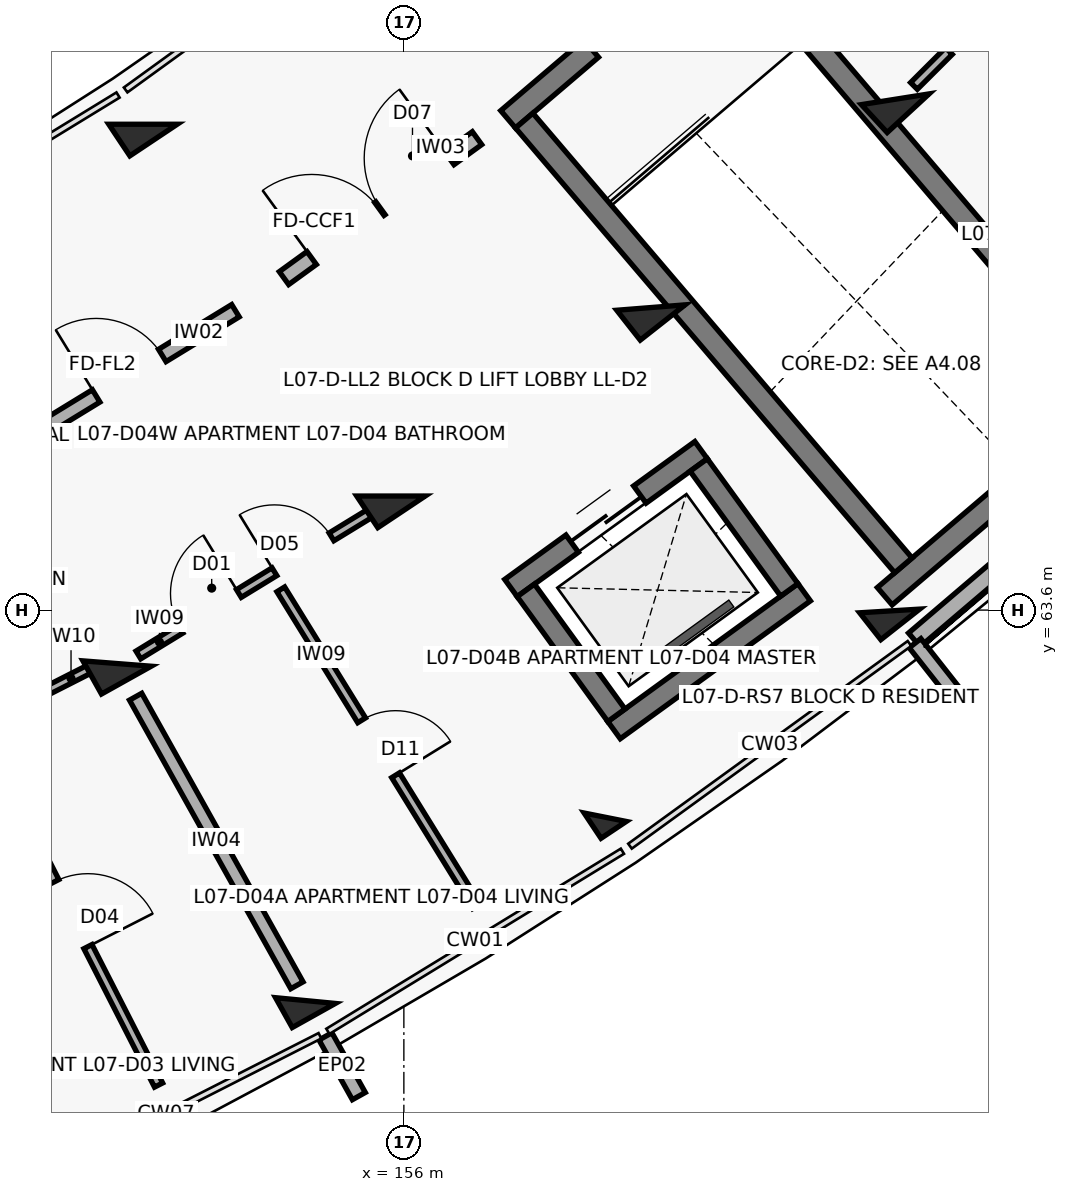
"""IFC4 building model, lengths in metres.
Left out: names, types, materials, properties, quantities, classifications, styles, units other than length and angle.
Written with IfcOpenShell. Run it as: python <this file> out.ifc"""

import sys

from ifc_helpers import new_model, si_unit, direction, frame, frame_2d, origin, origin_2d, place, context, subcontext, project, spatial, rectangle, extrude, element, fill, save


model = new_model("IFC4")
c1 = context("Model", 3, precision=1e-05, world=origin(), true_north=direction((0.0, 1.0)))
c2 = subcontext(c1, "Body", "Model", "MODEL_VIEW")
j1 = project(units=[si_unit("LENGTHUNIT", "METRE"), si_unit("PLANEANGLEUNIT", "RADIAN")], contexts=[c1])
p1 = place(None, origin())
s1 = spatial("IfcSite", under=j1, at=p1, CompositionType="ELEMENT")
p2 = place(p1, origin())
s2 = spatial("IfcBuilding", under=s1, at=p2, CompositionType="ELEMENT")
p3 = place(p2, frame((0.0, 0.0, 23.6)))
s3 = spatial("IfcBuildingStorey", under=s2, at=p3, CompositionType="ELEMENT", Elevation=23.6)
p4 = place(p3, frame((152.227, 62.897, 0.0), z_axis=(0.0, 0.0, 1.0), x_axis=(0.487859659139, -0.87292207727, 0.0)))
e1 = element("IfcColumn", 1, at=p4, inside=s3, PredefinedType="COLUMN", context=c2, shape_type="SweptSolid", body=[
    extrude(rectangle(XDim=0.5, YDim=0.75, at=origin_2d()), origin(), (0.0, 0.0, 1.0), 3.1),
])
p5 = place(p3, frame((154.705, 58.462, 0.0), z_axis=(0.0, 0.0, 1.0), x_axis=(0.487859659139, -0.87292207727, 0.0)))
e2 = element("IfcColumn", 2, at=p5, inside=s3, PredefinedType="COLUMN", context=c2, shape_type="SweptSolid", body=[
    extrude(rectangle(XDim=0.45, YDim=0.65, at=origin_2d()), origin(), (0.0, 0.0, 1.0), 3.1),
])
for number, where, z_axis, x_axis in (
    (3, (152.568, 69.993, 0.0), (0.0, 0.0, 1.0), (0.555, -0.832, 0.0)),
    (4, (155.831, 65.101, 0.0), (0.0, 0.0, 1.0), (0.555, -0.832, 0.0)),
):
    element("IfcColumn", number, at=place(p3, frame(where, z_axis=z_axis, x_axis=x_axis)), inside=s3, PredefinedType="COLUMN", context=c2, shape_type="SweptSolid", body=[
        extrude(rectangle(XDim=0.5, YDim=0.75, at=origin_2d()), origin(), (0.0, 0.0, 1.0), 3.1),
    ])
p6 = place(p3, frame((158.649, 60.875, 0.0), z_axis=(0.0, 0.0, 1.0), x_axis=(0.554844427448, -0.83195412213, 0.0)))
e5 = element("IfcColumn", 5, at=p6, inside=s3, PredefinedType="COLUMN", context=c2, shape_type="SweptSolid", body=[
    extrude(rectangle(XDim=0.4, YDim=0.4, at=origin_2d()), origin(), (0.0, 0.0, 1.0), 3.1),
])
p7 = place(p3, frame((159.25, 67.581, 0.0), z_axis=(0.0, 0.0, 1.0), x_axis=(0.618408395358, -0.785856893175, 0.0)))
e6 = element("IfcColumn", 6, at=p7, inside=s3, PredefinedType="COLUMN", context=c2, shape_type="SweptSolid", body=[
    extrude(rectangle(XDim=0.5, YDim=0.75, at=origin_2d()), origin(), (0.0, 0.0, 1.0), 3.1),
])
p8 = place(p3, frame((162.392, 63.589, 0.0), z_axis=(0.0, 0.0, 1.0), x_axis=(0.618408395358, -0.785856893175, 0.0)))
e7 = element("IfcColumn", 7, at=p8, inside=s3, PredefinedType="COLUMN", context=c2, shape_type="SweptSolid", body=[
    extrude(rectangle(XDim=0.45, YDim=0.65, at=origin_2d()), origin(), (0.0, 0.0, 1.0), 3.1),
])
p9 = place(p3, frame((162.465, 70.322, 0.0), z_axis=(0.0, 0.0, 1.0), x_axis=(0.678159669868, -0.73491459515, 0.0)))
e8 = element("IfcColumn", 8, at=p9, inside=s3, PredefinedType="COLUMN", context=c2, shape_type="SweptSolid", body=[
    extrude(rectangle(XDim=0.5, YDim=0.75, at=origin_2d()), origin(), (0.0, 0.0, 1.0), 3.1),
])
p10 = place(p3, frame((154.969, 57.991, 0.0), z_axis=(0.0, 0.0, 1.0), x_axis=(0.487967253808, -0.872861935939, 0.0)))
e9 = element("IfcWall", 9, at=p10, inside=s3, PredefinedType="PARAPET", context=c2, shape_type="SweptSolid", body=[
    extrude(rectangle(XDim=0.9, YDim=0.195, at=frame_2d((0.45, 0.0))), origin(), (0.0, 0.0, 1.0), 2.25),
])
p11 = place(p3, frame((162.716, 63.209, 0.0), z_axis=(0.0, 0.0, 1.0), x_axis=(0.760968923704, 0.64878833001, 0.0)))
e10 = element("IfcWall", 10, at=p11, inside=s3, PredefinedType="SOLIDWALL", context=c2, shape_type="SweptSolid", body=[
    extrude(rectangle(XDim=4.623, YDim=0.235, at=frame_2d((2.311, 0.0))), origin(), (0.0, 0.0, 1.0), 2.25),
])
p12 = place(p3, frame((162.726, 63.164, 0.0), z_axis=(0.0, 0.0, 1.0), x_axis=(0.618456270212, -0.785819217019, 0.0)))
e11 = element("IfcWall", 11, at=p12, inside=s3, PredefinedType="PARAPET", context=c2, shape_type="SweptSolid", body=[
    extrude(rectangle(XDim=0.9, YDim=0.195, at=frame_2d((0.45, 0.0))), origin(), (0.0, 0.0, 1.0), 2.25),
])
p13 = place(p3, frame((157.372, 70.058, 0.0), z_axis=(0.0, 0.0, 1.0), x_axis=(0.760990583254, 0.648762924495, 0.0)))
e12 = element("IfcWall", 12, at=p13, inside=s3, PredefinedType="SHEAR", context=c2, shape_type="SweptSolid", body=[
    extrude(rectangle(XDim=3.87, YDim=0.3, at=frame_2d((1.935, 0.0))), origin(), (0.0, 0.0, 1.0), 3.1),
])
p14 = place(p13, frame((1.435, 0.0, 0.0)))
e13 = element("IfcOpeningElement", 13, at=p14, cuts=e12, PredefinedType="OPENING", context=c2, shape_type="SweptSolid", body=[
    extrude(rectangle(XDim=1.0, YDim=2.15, at=frame_2d((0.5, 1.075))), frame((0.0, 0.16, 0.0), z_axis=(0.0, -1.0, 0.0), x_axis=(1.0, 0.0, 0.0)), (0.0, 0.0, 1.0), 0.32),
])
p15 = place(p3, frame((162.327, 63.783, 0.0), z_axis=(0.0, 0.0, 1.0), x_axis=(0.760969560012, 0.648787583678, 0.0)))
e14 = element("IfcWall", 14, at=p15, inside=s3, PredefinedType="SHEAR", context=c2, shape_type="SweptSolid", body=[
    extrude(rectangle(XDim=4.47, YDim=0.3, at=frame_2d((2.235, 0.0))), origin(), (0.0, 0.0, 1.0), 3.1),
])
p16 = place(p3, frame((157.583, 70.041, 0.0), z_axis=(0.0, 0.0, 1.0), x_axis=(0.648762810187, -0.760990680704, 0.0)))
e15 = element("IfcWall", 15, at=p16, inside=s3, PredefinedType="SHEAR", context=c2, shape_type="SweptSolid", body=[
    extrude(rectangle(XDim=7.69, YDim=0.3, at=frame_2d((3.845, 0.0))), origin(), (0.0, 0.0, 1.0), 3.1),
])
p17 = place(p3, frame((160.3, 72.357, 0.0), z_axis=(0.0, 0.0, 1.0), x_axis=(0.648781194888, -0.760975006922, 0.0)))
e16 = element("IfcWall", 16, at=p17, inside=s3, PredefinedType="SHEAR", context=c2, shape_type="SweptSolid", body=[
    extrude(rectangle(XDim=7.69, YDim=0.3, at=frame_2d((3.845, 0.0))), origin(), (0.0, 0.0, 1.0), 3.1),
])
p18 = place(p3, frame((157.409, 63.89, 0.0), z_axis=(0.0, 0.0, 1.0), x_axis=(0.809510936031, 0.587104798521, 0.0)))
e17 = element("IfcWall", 17, at=p18, inside=s3, PredefinedType="SHEAR", context=c2, shape_type="SweptSolid", body=[
    extrude(rectangle(XDim=3.09, YDim=0.28, at=frame_2d((1.545, 0.0))), origin(), (0.0, 0.0, 1.0), 3.1),
])
p19 = place(p18, frame((0.995, 0.0, 0.0)))
e18 = element("IfcOpeningElement", 18, at=p19, cuts=e17, PredefinedType="OPENING", context=c2, shape_type="SweptSolid", body=[
    extrude(rectangle(XDim=1.1, YDim=2.15, at=frame_2d((0.55, 1.075))), frame((0.0, 0.15, 0.0), z_axis=(0.0, -1.0, 0.0), x_axis=(1.0, 0.0, 0.0)), (0.0, 0.0, 1.0), 0.3),
])
p20 = place(p3, frame((158.765, 62.021, 0.0), z_axis=(0.0, 0.0, 1.0), x_axis=(0.809548485838, 0.587053020669, 0.0)))
e19 = element("IfcWall", 19, at=p20, inside=s3, PredefinedType="SHEAR", context=c2, shape_type="SweptSolid", body=[
    extrude(rectangle(XDim=3.09, YDim=0.28, at=frame_2d((1.545, 0.0))), origin(), (0.0, 0.0, 1.0), 3.1),
])
p21 = place(p3, frame((157.604, 63.859, 0.0), z_axis=(0.0, 0.0, 1.0), x_axis=(0.587127188998, -0.809494696671, 0.0)))
e20 = element("IfcWall", 20, at=p21, inside=s3, PredefinedType="SHEAR", context=c2, shape_type="SweptSolid", body=[
    extrude(rectangle(XDim=2.03, YDim=0.28, at=frame_2d((1.015, 0.0))), origin(), (0.0, 0.0, 1.0), 3.1),
])
p22 = place(p3, frame((159.879, 65.509, 0.0), z_axis=(0.0, 0.0, 1.0), x_axis=(0.58704837408, -0.809551855344, 0.0)))
e21 = element("IfcWall", 21, at=p22, inside=s3, PredefinedType="SHEAR", context=c2, shape_type="SweptSolid", body=[
    extrude(rectangle(XDim=2.03, YDim=0.28, at=frame_2d((1.015, 0.0))), origin(), (0.0, 0.0, 1.0), 3.1),
])
p23 = place(p3, frame((148.687, 61.209, 0.0), z_axis=(0.0, 0.0, 1.0), x_axis=(0.891396224028, 0.453224857866, 0.0)))
e22 = element("IfcWall", 22, at=p23, inside=s3, PredefinedType="PARTITIONING", context=c2, shape_type="SweptSolid", body=[
    extrude(rectangle(XDim=3.617, YDim=0.115, at=frame_2d((1.808, 0.0))), origin(), (0.0, 0.0, 1.0), 2.14),
])
p24 = place(p23, frame((0.65, 0.0, 0.0)))
e23 = element("IfcOpeningElement", 23, at=p24, cuts=e22, PredefinedType="OPENING", context=c2, shape_type="SweptSolid", body=[
    extrude(rectangle(XDim=0.9, YDim=2.1, at=frame_2d((0.45, 1.05))), frame((0.0, 0.067, 0.0), z_axis=(0.0, -1.0, 0.0), x_axis=(1.0, 0.0, 0.0)), (0.0, 0.0, 1.0), 0.135),
])
p25 = place(p23, frame((2.086, 0.0, 0.0)))
e24 = element("IfcOpeningElement", 24, at=p25, cuts=e22, PredefinedType="OPENING", context=c2, shape_type="SweptSolid", body=[
    extrude(rectangle(XDim=0.88, YDim=2.1, at=frame_2d((0.44, 1.05))), frame((0.0, 0.067, 0.0), z_axis=(0.0, -1.0, 0.0), x_axis=(1.0, 0.0, 0.0)), (0.0, 0.0, 1.0), 0.135),
])
p26 = place(p3, frame((150.478, 61.849, 0.0), z_axis=(0.0, 0.0, 1.0), x_axis=(0.454489129902, -0.890752283635, 0.0)))
e25 = element("IfcWall", 25, at=p26, inside=s3, PredefinedType="PARTITIONING", context=c2, shape_type="SweptSolid", body=[
    extrude(rectangle(XDim=5.05, YDim=0.12, at=frame_2d((2.525, 0.0))), origin(), (0.0, 0.0, 1.0), 2.14),
])
p27 = place(p26, frame((2.045, 0.0, 0.0)))
e26 = element("IfcOpeningElement", 26, at=p27, cuts=e25, PredefinedType="OPENING", context=c2, shape_type="SweptSolid", body=[
    extrude(rectangle(XDim=0.96, YDim=2.1, at=frame_2d((0.48, 1.05))), frame((0.0, 0.07, 0.0), z_axis=(0.0, -1.0, 0.0), x_axis=(1.0, 0.0, 0.0)), (0.0, 0.0, 1.0), 0.14),
])
p28 = place(p3, frame((150.989, 65.829, 0.0), z_axis=(0.0, 0.0, 1.0), x_axis=(0.853090237845, 0.521763400492, 0.0)))
e27 = element("IfcWall", 27, at=p28, inside=s3, PredefinedType="SOLIDWALL", context=c2, shape_type="SweptSolid", body=[
    extrude(rectangle(XDim=3.277, YDim=0.19, at=frame_2d((1.638, 0.0))), origin(), (0.0, 0.0, 1.0), 2.14),
])
p29 = place(p28, frame((1.128, 0.0, 0.0)))
e28 = element("IfcOpeningElement", 28, at=p29, cuts=e27, PredefinedType="OPENING", context=c2, shape_type="SweptSolid", body=[
    extrude(rectangle(XDim=1.02, YDim=2.15, at=frame_2d((0.51, 1.075))), frame((0.0, 0.105, 0.0), z_axis=(0.0, -1.0, 0.0), x_axis=(1.0, 0.0, 0.0)), (0.0, 0.0, 1.0), 0.21),
])
p30 = place(p3, frame((152.507, 63.01, 0.0), z_axis=(0.0, 0.0, 1.0), x_axis=(0.853110474662, 0.521730311581, 0.0)))
e29 = element("IfcWall", 29, at=p30, inside=s3, PredefinedType="PARTITIONING", context=c2, shape_type="SweptSolid", body=[
    extrude(rectangle(XDim=3.628, YDim=0.12, at=frame_2d((1.814, 0.0))), origin(), (0.0, 0.0, 1.0), 2.14),
])
p31 = place(p30, frame((0.65, 0.0, 0.0)))
e30 = element("IfcOpeningElement", 30, at=p31, cuts=e29, PredefinedType="OPENING", context=c2, shape_type="SweptSolid", body=[
    extrude(rectangle(XDim=0.9, YDim=2.1, at=frame_2d((0.45, 1.05))), frame((0.0, 0.07, 0.0), z_axis=(0.0, -1.0, 0.0), x_axis=(1.0, 0.0, 0.0)), (0.0, 0.0, 1.0), 0.14),
])
p32 = place(p30, frame((2.098, 0.0, 0.0)))
e31 = element("IfcOpeningElement", 31, at=p32, cuts=e29, PredefinedType="OPENING", context=c2, shape_type="SweptSolid", body=[
    extrude(rectangle(XDim=0.88, YDim=2.1, at=frame_2d((0.44, 1.05))), frame((0.0, 0.07, 0.0), z_axis=(0.0, -1.0, 0.0), x_axis=(1.0, 0.0, 0.0)), (0.0, 0.0, 1.0), 0.14),
])
p33 = place(p3, frame((154.38, 63.873, 0.0), z_axis=(0.0, 0.0, 1.0), x_axis=(0.525458935368, -0.850818962672, 0.0)))
e32 = element("IfcWall", 32, at=p33, inside=s3, PredefinedType="PARTITIONING", context=c2, shape_type="SweptSolid", body=[
    extrude(rectangle(XDim=4.9, YDim=0.12, at=frame_2d((2.45, 0.0))), origin(), (0.0, 0.0, 1.0), 2.14),
])
p34 = place(p33, frame((2.025, 0.0, 0.0)))
e33 = element("IfcOpeningElement", 33, at=p34, cuts=e32, PredefinedType="OPENING", context=c2, shape_type="SweptSolid", body=[
    extrude(rectangle(XDim=0.85, YDim=2.1, at=frame_2d((0.425, 1.05))), frame((0.0, 0.07, 0.0), z_axis=(0.0, -1.0, 0.0), x_axis=(1.0, 0.0, 0.0)), (0.0, 0.0, 1.0), 0.14),
])
p35 = place(p3, frame((152.471, 62.46, 0.0), z_axis=(0.0, 0.0, 1.0), x_axis=(0.487866639184, -0.872918176218, 0.0)))
e34 = element("IfcWall", 34, at=p35, inside=s3, PredefinedType="SOLIDWALL", context=c2, shape_type="SweptSolid", body=[
    extrude(rectangle(XDim=4.35, YDim=0.185, at=frame_2d((2.175, 0.0))), origin(), (0.0, 0.0, 1.0), 2.14),
])
p36 = place(p3, frame((154.423, 67.968, 0.0), z_axis=(0.0, 0.0, 1.0), x_axis=(0.809516127005, 0.587097641043, 0.0)))
e35 = element("IfcWall", 35, at=p36, inside=s3, PredefinedType="SOLIDWALL", context=c2, shape_type="SweptSolid", body=[
    extrude(rectangle(XDim=3.137, YDim=0.21, at=frame_2d((1.569, 0.0))), origin(), (0.0, 0.0, 1.0), 2.14),
])
p37 = place(p36, frame((0.45, 0.0, 0.0)))
e36 = element("IfcOpeningElement", 36, at=p37, cuts=e35, PredefinedType="OPENING", context=c2, shape_type="SweptSolid", body=[
    extrude(rectangle(XDim=1.1, YDim=2.15, at=frame_2d((0.55, 1.075))), frame((0.0, 0.115, 0.0), z_axis=(0.0, -1.0, 0.0), x_axis=(1.0, 0.0, 0.0)), (0.0, 0.0, 1.0), 0.23),
])
p38 = place(p36, frame((1.567, 0.0, 0.0)))
e37 = element("IfcOpeningElement", 37, at=p38, cuts=e35, PredefinedType="OPENING", context=c2, shape_type="SweptSolid", body=[
    extrude(rectangle(XDim=1.12, YDim=2.15, at=frame_2d((0.56, 1.075))), frame((0.0, 0.115, 0.0), z_axis=(0.0, -1.0, 0.0), x_axis=(1.0, 0.0, 0.0)), (0.0, 0.0, 1.0), 0.23),
])
p39 = place(p3, frame((162.711, 70.497, 0.0), z_axis=(0.0, 0.0, 1.0), x_axis=(0.70774573777, 0.706467246706, 0.0)))
e38 = element("IfcWall", 38, at=p39, inside=s3, PredefinedType="PARTITIONING", context=c2, shape_type="SweptSolid", body=[
    extrude(rectangle(XDim=3.628, YDim=0.125, at=frame_2d((1.814, 0.0))), origin(), (0.0, 0.0, 1.0), 2.14),
])
p40 = place(p39, frame((0.65, 0.0, 0.0)))
e39 = element("IfcOpeningElement", 39, at=p40, cuts=e38, PredefinedType="OPENING", context=c2, shape_type="SweptSolid", body=[
    extrude(rectangle(XDim=0.9, YDim=2.1, at=frame_2d((0.45, 1.05))), frame((0.0, 0.073, 0.0), z_axis=(0.0, -1.0, 0.0), x_axis=(1.0, 0.0, 0.0)), (0.0, 0.0, 1.0), 0.145),
])
p41 = place(p39, frame((2.098, 0.0, 0.0)))
e40 = element("IfcOpeningElement", 40, at=p41, cuts=e38, PredefinedType="OPENING", context=c2, shape_type="SweptSolid", body=[
    extrude(rectangle(XDim=0.88, YDim=2.1, at=frame_2d((0.44, 1.05))), frame((0.0, 0.073, 0.0), z_axis=(0.0, -1.0, 0.0), x_axis=(1.0, 0.0, 0.0)), (0.0, 0.0, 1.0), 0.145),
])
p42 = place(p19, origin())
e41 = element("IfcDoor", 41, at=p42, inside=s3, OperationType="DOUBLE_DOOR_SLIDING", PredefinedType="DOOR", context=c2, shape_type="SweptSolid", body=[
    extrude(rectangle(XDim=1.1, YDim=2.15, at=frame_2d((0.55, 1.075))), frame((0.0, 0.025, 0.0), z_axis=(0.0, -1.0, 0.0), x_axis=(1.0, 0.0, 0.0)), (0.0, 0.0, 1.0), 0.05),
])
fill(e18, e41)
p43 = place(p27, origin())
e42 = element("IfcDoor", 42, at=p43, inside=s3, OperationType="SINGLE_SWING_RIGHT", PredefinedType="DOOR", context=c2, shape_type="SweptSolid", body=[
    extrude(rectangle(XDim=0.96, YDim=2.1, at=frame_2d((0.48, 1.05))), frame((0.0, 0.025, 0.0), z_axis=(0.0, -1.0, 0.0), x_axis=(1.0, 0.0, 0.0)), (0.0, 0.0, 1.0), 0.05),
])
fill(e26, e42)
p44 = place(p29, origin())
e43 = element("IfcDoor", 43, at=p44, inside=s3, OperationType="SINGLE_SWING_LEFT", PredefinedType="DOOR", context=c2, shape_type="SweptSolid", body=[
    extrude(rectangle(XDim=1.02, YDim=2.15, at=frame_2d((0.51, 1.075))), frame((0.0, 0.025, 0.0), z_axis=(0.0, -1.0, 0.0), x_axis=(1.0, 0.0, 0.0)), (0.0, 0.0, 1.0), 0.05),
])
fill(e28, e43)
p45 = place(p31, origin())
e44 = element("IfcDoor", 44, at=p45, inside=s3, OperationType="SINGLE_SWING_RIGHT", PredefinedType="DOOR", context=c2, shape_type="SweptSolid", body=[
    extrude(rectangle(XDim=0.9, YDim=2.1, at=frame_2d((0.45, 1.05))), frame((0.0, 0.025, 0.0), z_axis=(0.0, -1.0, 0.0), x_axis=(1.0, 0.0, 0.0)), (0.0, 0.0, 1.0), 0.05),
])
fill(e30, e44)
p46 = place(p32, origin())
e45 = element("IfcDoor", 45, at=p46, inside=s3, OperationType="SINGLE_SWING_LEFT", PredefinedType="DOOR", context=c2, shape_type="SweptSolid", body=[
    extrude(rectangle(XDim=0.88, YDim=2.1, at=frame_2d((0.44, 1.05))), frame((0.0, 0.025, 0.0), z_axis=(0.0, -1.0, 0.0), x_axis=(1.0, 0.0, 0.0)), (0.0, 0.0, 1.0), 0.05),
])
fill(e31, e45)
p47 = place(p34, origin())
e46 = element("IfcDoor", 46, at=p47, inside=s3, OperationType="SINGLE_SWING_RIGHT", PredefinedType="DOOR", context=c2, shape_type="SweptSolid", body=[
    extrude(rectangle(XDim=0.85, YDim=2.1, at=frame_2d((0.425, 1.05))), frame((0.0, 0.025, 0.0), z_axis=(0.0, -1.0, 0.0), x_axis=(1.0, 0.0, 0.0)), (0.0, 0.0, 1.0), 0.05),
])
fill(e33, e46)
p48 = place(p37, origin())
e47 = element("IfcDoor", 47, at=p48, inside=s3, OperationType="SINGLE_SWING_LEFT", PredefinedType="DOOR", context=c2, shape_type="SweptSolid", body=[
    extrude(rectangle(XDim=1.1, YDim=2.15, at=frame_2d((0.55, 1.075))), frame((0.0, 0.025, 0.0), z_axis=(0.0, -1.0, 0.0), x_axis=(1.0, 0.0, 0.0)), (0.0, 0.0, 1.0), 0.05),
])
fill(e36, e47)
p49 = place(p38, origin())
e48 = element("IfcDoor", 48, at=p49, inside=s3, OperationType="SINGLE_SWING_RIGHT", PredefinedType="DOOR", context=c2, shape_type="SweptSolid", body=[
    extrude(rectangle(XDim=1.12, YDim=2.15, at=frame_2d((0.56, 1.075))), frame((0.0, 0.025, 0.0), z_axis=(0.0, -1.0, 0.0), x_axis=(1.0, 0.0, 0.0)), (0.0, 0.0, 1.0), 0.05),
])
fill(e37, e48)
p50 = place(p40, origin())
e49 = element("IfcDoor", 49, at=p50, inside=s3, OperationType="SINGLE_SWING_LEFT", PredefinedType="DOOR", context=c2, shape_type="SweptSolid", body=[
    extrude(rectangle(XDim=0.9, YDim=2.1, at=frame_2d((0.45, 1.05))), frame((0.0, 0.025, 0.0), z_axis=(0.0, -1.0, 0.0), x_axis=(1.0, 0.0, 0.0)), (0.0, 0.0, 1.0), 0.05),
])
fill(e39, e49)
save(model, sys.argv[1])
